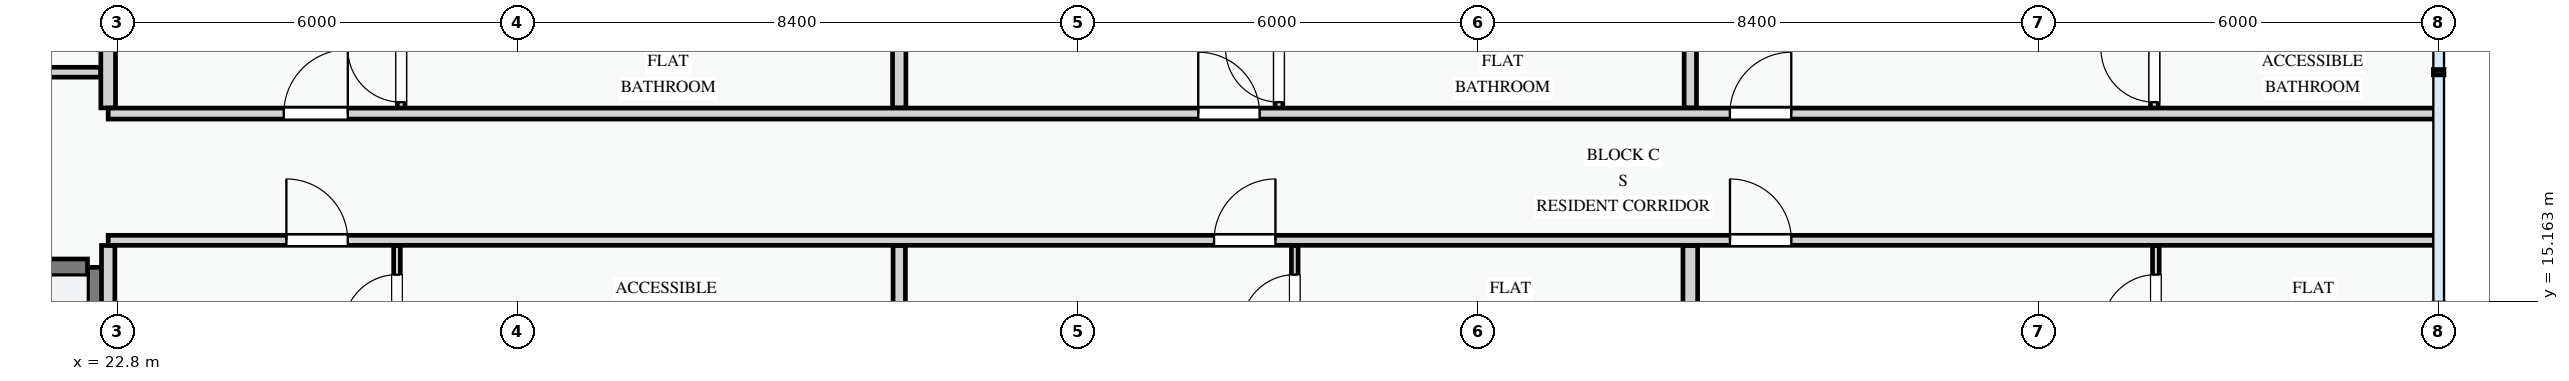
"""IFC4 building model, lengths in metres.
Left out: names, types, materials, properties, quantities, classifications, styles, units other than length and angle.
Written with IfcOpenShell. Run it as: python <this file> out.ifc"""

import sys

from ifc_helpers import new_model, si_unit, direction, frame, frame_2d, origin, place, context, subcontext, project, spatial, rectangle, extrude, element, fill, save


model = new_model("IFC4")
c1 = context("Model", 3, precision=1e-05, world=origin(), true_north=direction((0.0, 1.0)))
c2 = subcontext(c1, "Body", "Model", "MODEL_VIEW")
j1 = project(units=[si_unit("LENGTHUNIT", "METRE"), si_unit("PLANEANGLEUNIT", "RADIAN")], contexts=[c1])
p1 = place(None, origin())
s1 = spatial("IfcSite", under=j1, at=p1, CompositionType="ELEMENT")
p2 = place(p1, origin())
s2 = spatial("IfcBuilding", under=s1, at=p2, CompositionType="ELEMENT")
p3 = place(p2, frame((0.0, 0.0, 11.4)))
s3 = spatial("IfcBuildingStorey", under=s2, at=p3, CompositionType="ELEMENT", Elevation=11.4)
p4 = place(p3, frame((22.475, 8.75, 0.0), z_axis=(0.0, 0.0, 1.0), x_axis=(0.0, 1.0, 0.0)))
e1 = element("IfcWall", 1, at=p4, inside=s3, PredefinedType="SHEAR", context=c2, shape_type="SweptSolid", body=[
    extrude(rectangle(XDim=6.925, YDim=0.25, at=frame_2d((3.462, 0.0))), origin(), (0.0, 0.0, 1.0), 3.0),
])
p5 = place(p3, frame((8.85, 15.675, 0.0), z_axis=(0.0, 0.0, 1.0), x_axis=(1.0, 0.0, 0.0)))
e2 = element("IfcWall", 2, at=p5, inside=s3, PredefinedType="SHEAR", context=c2, shape_type="SweptSolid", body=[
    extrude(rectangle(XDim=13.5, YDim=0.25, at=frame_2d((6.75, 0.0))), origin(), (0.0, 0.0, 1.0), 3.0),
])
p6 = place(p5, frame((6.2, 0.0, 0.0)))
e3 = element("IfcOpeningElement", 3, at=p6, cuts=e2, PredefinedType="OPENING", context=c2, shape_type="SweptSolid", body=[
    extrude(rectangle(XDim=1.1, YDim=2.15, at=frame_2d((0.55, 1.075))), frame((0.0, 0.135, 0.0), z_axis=(0.0, -1.0, 0.0), x_axis=(1.0, 0.0, 0.0)), (0.0, 0.0, 1.0), 0.27),
])
p7 = place(p3, frame((18.025, 18.6, 0.0), z_axis=(0.0, 0.0, 1.0), x_axis=(1.0, 0.0, 0.0)))
e4 = element("IfcWall", 4, at=p7, inside=s3, PredefinedType="PARTITIONING", context=c2, shape_type="SweptSolid", body=[
    extrude(rectangle(XDim=4.523, YDim=0.148, at=frame_2d((2.262, 0.0))), origin(), (0.0, 0.0, 1.0), 3.0),
])
p8 = place(p7, frame((1.65, 0.0, 0.0)))
e5 = element("IfcOpeningElement", 5, at=p8, cuts=e4, PredefinedType="OPENING", context=c2, shape_type="SweptSolid", body=[
    extrude(rectangle(XDim=1.0, YDim=2.15, at=frame_2d((0.5, 1.075))), frame((0.0, 0.084, 0.0), z_axis=(0.0, -1.0, 0.0), x_axis=(1.0, 0.0, 0.0)), (0.0, 0.0, 1.0), 0.168),
])
p9 = place(p3, frame((26.99, 8.57, 0.0), z_axis=(0.0, 0.0, 1.0), x_axis=(0.0, 1.0, 0.0)))
e6 = element("IfcWall", 6, at=p9, inside=s3, PredefinedType="PARTITIONING", context=c2, shape_type="SweptSolid", body=[
    extrude(rectangle(XDim=7.433, YDim=0.1, at=frame_2d((3.717, 0.0))), origin(), (0.0, 0.0, 1.0), 3.0),
])
p10 = place(p9, frame((1.294, 0.0, 0.0)))
e7 = element("IfcOpeningElement", 7, at=p10, cuts=e6, PredefinedType="OPENING", context=c2, shape_type="SweptSolid", body=[
    extrude(rectangle(XDim=0.85, YDim=2.1, at=frame_2d((0.425, 1.05))), frame((0.0, 0.06, 0.0), z_axis=(0.0, -1.0, 0.0), x_axis=(1.0, 0.0, 0.0)), (0.0, 0.0, 1.0), 0.12),
])
p11 = place(p9, frame((4.19, 0.0, 0.0)))
e8 = element("IfcOpeningElement", 8, at=p11, cuts=e6, PredefinedType="OPENING", context=c2, shape_type="SweptSolid", body=[
    extrude(rectangle(XDim=0.85, YDim=2.1, at=frame_2d((0.425, 1.05))), frame((0.0, 0.06, 0.0), z_axis=(0.0, -1.0, 0.0), x_axis=(1.0, 0.0, 0.0)), (0.0, 0.0, 1.0), 0.12),
])
p12 = place(p9, frame((6.196, 0.0, 0.0)))
e9 = element("IfcOpeningElement", 9, at=p12, cuts=e6, PredefinedType="OPENING", context=c2, shape_type="SweptSolid", body=[
    extrude(rectangle(XDim=0.8, YDim=2.1, at=frame_2d((0.4, 1.05))), frame((0.0, 0.06, 0.0), z_axis=(0.0, -1.0, 0.0), x_axis=(1.0, 0.0, 0.0)), (0.0, 0.0, 1.0), 0.12),
])
p13 = place(p3, frame((27.053, 17.98, 0.0), z_axis=(0.0, 0.0, 1.0), x_axis=(0.0, 1.0, 0.0)))
e10 = element("IfcWall", 10, at=p13, inside=s3, PredefinedType="PARTITIONING", context=c2, shape_type="SweptSolid", body=[
    extrude(rectangle(XDim=4.651, YDim=0.115, at=frame_2d((2.325, 0.0))), origin(), (0.0, 0.0, 1.0), 3.0),
])
p14 = place(p13, frame((0.171, 0.0, 0.0)))
e11 = element("IfcOpeningElement", 11, at=p14, cuts=e10, PredefinedType="OPENING", context=c2, shape_type="SweptSolid", body=[
    extrude(rectangle(XDim=0.8, YDim=2.1, at=frame_2d((0.4, 1.05))), frame((0.0, 0.067, 0.0), z_axis=(0.0, -1.0, 0.0), x_axis=(1.0, 0.0, 0.0)), (0.0, 0.0, 1.0), 0.135),
])
p15 = place(p13, frame((1.384, 0.0, 0.0)))
e12 = element("IfcOpeningElement", 12, at=p15, cuts=e10, PredefinedType="OPENING", context=c2, shape_type="SweptSolid", body=[
    extrude(rectangle(XDim=0.85, YDim=2.1, at=frame_2d((0.425, 1.05))), frame((0.0, 0.067, 0.0), z_axis=(0.0, -1.0, 0.0), x_axis=(1.0, 0.0, 0.0)), (0.0, 0.0, 1.0), 0.135),
])
p16 = place(p13, frame((3.193, 0.0, 0.0)))
e13 = element("IfcOpeningElement", 13, at=p16, cuts=e10, PredefinedType="OPENING", context=c2, shape_type="SweptSolid", body=[
    extrude(rectangle(XDim=0.85, YDim=2.1, at=frame_2d((0.425, 1.05))), frame((0.0, 0.067, 0.0), z_axis=(0.0, -1.0, 0.0), x_axis=(1.0, 0.0, 0.0)), (0.0, 0.0, 1.0), 0.135),
])
p17 = place(p3, frame((22.66, 8.57, 0.0), z_axis=(0.0, 0.0, 1.0), x_axis=(0.0, 1.0, 0.0)))
e14 = element("IfcWall", 14, at=p17, inside=s3, PredefinedType="PARTITIONING", context=c2, shape_type="SweptSolid", body=[
    extrude(rectangle(XDim=7.433, YDim=0.2, at=frame_2d((3.717, 0.0))), origin(), (0.0, 0.0, 1.0), 2.425),
])
p18 = place(p3, frame((22.66, 18.064, 0.0), z_axis=(0.0, 0.0, 1.0), x_axis=(0.0, 1.0, 0.0)))
e15 = element("IfcWall", 15, at=p18, inside=s3, PredefinedType="PARTITIONING", context=c2, shape_type="SweptSolid", body=[
    extrude(rectangle(XDim=4.676, YDim=0.22, at=frame_2d((2.338, 0.0))), origin(), (0.0, 0.0, 1.0), 2.425),
])
p19 = place(p3, frame((40.45, 8.57, 0.0), z_axis=(0.0, 0.0, 1.0), x_axis=(0.0, 1.0, 0.0)))
e16 = element("IfcWall", 16, at=p19, inside=s3, PredefinedType="PARTITIONING", context=c2, shape_type="SweptSolid", body=[
    extrude(rectangle(XDim=7.433, YDim=0.1, at=frame_2d((3.717, 0.0))), origin(), (0.0, 0.0, 1.0), 3.0),
])
p20 = place(p19, frame((1.294, 0.0, 0.0)))
e17 = element("IfcOpeningElement", 17, at=p20, cuts=e16, PredefinedType="OPENING", context=c2, shape_type="SweptSolid", body=[
    extrude(rectangle(XDim=0.82, YDim=2.08, at=frame_2d((0.41, 1.04))), frame((0.0, 0.06, 0.0), z_axis=(0.0, -1.0, 0.0), x_axis=(1.0, 0.0, 0.0)), (0.0, 0.0, 1.0), 0.12),
])
p21 = place(p19, frame((4.19, 0.0, 0.0)))
e18 = element("IfcOpeningElement", 18, at=p21, cuts=e16, PredefinedType="OPENING", context=c2, shape_type="SweptSolid", body=[
    extrude(rectangle(XDim=0.85, YDim=2.1, at=frame_2d((0.425, 1.05))), frame((0.0, 0.06, 0.0), z_axis=(0.0, -1.0, 0.0), x_axis=(1.0, 0.0, 0.0)), (0.0, 0.0, 1.0), 0.12),
])
p22 = place(p19, frame((6.196, 0.0, 0.0)))
e19 = element("IfcOpeningElement", 19, at=p22, cuts=e16, PredefinedType="OPENING", context=c2, shape_type="SweptSolid", body=[
    extrude(rectangle(XDim=0.8, YDim=2.1, at=frame_2d((0.4, 1.05))), frame((0.0, 0.06, 0.0), z_axis=(0.0, -1.0, 0.0), x_axis=(1.0, 0.0, 0.0)), (0.0, 0.0, 1.0), 0.12),
])
p23 = place(p3, frame((40.213, 17.98, 0.0), z_axis=(0.0, 0.0, 1.0), x_axis=(0.0, 1.0, 0.0)))
e20 = element("IfcWall", 20, at=p23, inside=s3, PredefinedType="PARTITIONING", context=c2, shape_type="SweptSolid", body=[
    extrude(rectangle(XDim=4.651, YDim=0.115, at=frame_2d((2.325, 0.0))), origin(), (0.0, 0.0, 1.0), 3.0),
])
p24 = place(p23, frame((0.171, 0.0, 0.0)))
e21 = element("IfcOpeningElement", 21, at=p24, cuts=e20, PredefinedType="OPENING", context=c2, shape_type="SweptSolid", body=[
    extrude(rectangle(XDim=0.8, YDim=2.1, at=frame_2d((0.4, 1.05))), frame((0.0, 0.067, 0.0), z_axis=(0.0, -1.0, 0.0), x_axis=(1.0, 0.0, 0.0)), (0.0, 0.0, 1.0), 0.135),
])
p25 = place(p23, frame((1.384, 0.0, 0.0)))
e22 = element("IfcOpeningElement", 22, at=p25, cuts=e20, PredefinedType="OPENING", context=c2, shape_type="SweptSolid", body=[
    extrude(rectangle(XDim=0.82, YDim=2.08, at=frame_2d((0.41, 1.04))), frame((0.0, 0.067, 0.0), z_axis=(0.0, -1.0, 0.0), x_axis=(1.0, 0.0, 0.0)), (0.0, 0.0, 1.0), 0.135),
])
p26 = place(p23, frame((3.193, 0.0, 0.0)))
e23 = element("IfcOpeningElement", 23, at=p26, cuts=e20, PredefinedType="OPENING", context=c2, shape_type="SweptSolid", body=[
    extrude(rectangle(XDim=0.85, YDim=2.1, at=frame_2d((0.425, 1.05))), frame((0.0, 0.067, 0.0), z_axis=(0.0, -1.0, 0.0), x_axis=(1.0, 0.0, 0.0)), (0.0, 0.0, 1.0), 0.135),
])
p27 = place(p3, frame((34.52, 8.57, 0.0), z_axis=(0.0, 0.0, 1.0), x_axis=(0.0, 1.0, 0.0)))
e24 = element("IfcWall", 24, at=p27, inside=s3, PredefinedType="PARTITIONING", context=c2, shape_type="SweptSolid", body=[
    extrude(rectangle(XDim=7.433, YDim=0.185, at=frame_2d((3.717, 0.0))), origin(), (0.0, 0.0, 1.0), 3.0),
])
p28 = place(p3, frame((34.52, 18.064, 0.0), z_axis=(0.0, 0.0, 1.0), x_axis=(0.0, 1.0, 0.0)))
e25 = element("IfcWall", 25, at=p28, inside=s3, PredefinedType="PARTITIONING", context=c2, shape_type="SweptSolid", body=[
    extrude(rectangle(XDim=4.566, YDim=0.2, at=frame_2d((2.283, 0.0))), origin(), (0.0, 0.0, 1.0), 3.0),
])
p29 = place(p3, frame((53.36, 8.57, 0.0), z_axis=(0.0, 0.0, 1.0), x_axis=(0.0, 1.0, 0.0)))
e26 = element("IfcWall", 26, at=p29, inside=s3, PredefinedType="PARTITIONING", context=c2, shape_type="SweptSolid", body=[
    extrude(rectangle(XDim=7.433, YDim=0.1, at=frame_2d((3.717, 0.0))), origin(), (0.0, 0.0, 1.0), 3.0),
])
p30 = place(p29, frame((1.294, 0.0, 0.0)))
e27 = element("IfcOpeningElement", 27, at=p30, cuts=e26, PredefinedType="OPENING", context=c2, shape_type="SweptSolid", body=[
    extrude(rectangle(XDim=0.85, YDim=2.1, at=frame_2d((0.425, 1.05))), frame((0.0, 0.06, 0.0), z_axis=(0.0, -1.0, 0.0), x_axis=(1.0, 0.0, 0.0)), (0.0, 0.0, 1.0), 0.12),
])
p31 = place(p29, frame((4.19, 0.0, 0.0)))
e28 = element("IfcOpeningElement", 28, at=p31, cuts=e26, PredefinedType="OPENING", context=c2, shape_type="SweptSolid", body=[
    extrude(rectangle(XDim=0.85, YDim=2.1, at=frame_2d((0.425, 1.05))), frame((0.0, 0.06, 0.0), z_axis=(0.0, -1.0, 0.0), x_axis=(1.0, 0.0, 0.0)), (0.0, 0.0, 1.0), 0.12),
])
p32 = place(p29, frame((6.196, 0.0, 0.0)))
e29 = element("IfcOpeningElement", 29, at=p32, cuts=e26, PredefinedType="OPENING", context=c2, shape_type="SweptSolid", body=[
    extrude(rectangle(XDim=0.8, YDim=2.1, at=frame_2d((0.4, 1.05))), frame((0.0, 0.06, 0.0), z_axis=(0.0, -1.0, 0.0), x_axis=(1.0, 0.0, 0.0)), (0.0, 0.0, 1.0), 0.12),
])
p33 = place(p3, frame((53.337, 17.98, 0.0), z_axis=(0.0, 0.0, 1.0), x_axis=(0.0, 1.0, 0.0)))
e30 = element("IfcWall", 30, at=p33, inside=s3, PredefinedType="PARTITIONING", context=c2, shape_type="SweptSolid", body=[
    extrude(rectangle(XDim=4.651, YDim=0.115, at=frame_2d((2.325, 0.0))), origin(), (0.0, 0.0, 1.0), 3.0),
])
p34 = place(p33, frame((0.171, 0.0, 0.0)))
e31 = element("IfcOpeningElement", 31, at=p34, cuts=e30, PredefinedType="OPENING", context=c2, shape_type="SweptSolid", body=[
    extrude(rectangle(XDim=0.8, YDim=2.1, at=frame_2d((0.4, 1.05))), frame((0.0, 0.067, 0.0), z_axis=(0.0, -1.0, 0.0), x_axis=(1.0, 0.0, 0.0)), (0.0, 0.0, 1.0), 0.135),
])
p35 = place(p33, frame((1.384, 0.0, 0.0)))
e32 = element("IfcOpeningElement", 32, at=p35, cuts=e30, PredefinedType="OPENING", context=c2, shape_type="SweptSolid", body=[
    extrude(rectangle(XDim=0.85, YDim=2.1, at=frame_2d((0.425, 1.05))), frame((0.0, 0.067, 0.0), z_axis=(0.0, -1.0, 0.0), x_axis=(1.0, 0.0, 0.0)), (0.0, 0.0, 1.0), 0.135),
])
p36 = place(p33, frame((3.193, 0.0, 0.0)))
e33 = element("IfcOpeningElement", 33, at=p36, cuts=e30, PredefinedType="OPENING", context=c2, shape_type="SweptSolid", body=[
    extrude(rectangle(XDim=0.85, YDim=2.1, at=frame_2d((0.425, 1.05))), frame((0.0, 0.067, 0.0), z_axis=(0.0, -1.0, 0.0), x_axis=(1.0, 0.0, 0.0)), (0.0, 0.0, 1.0), 0.135),
])
p37 = place(p3, frame((46.38, 8.57, 0.0), z_axis=(0.0, 0.0, 1.0), x_axis=(0.0, 1.0, 0.0)))
e34 = element("IfcWall", 34, at=p37, inside=s3, PredefinedType="PARTITIONING", context=c2, shape_type="SweptSolid", body=[
    extrude(rectangle(XDim=7.433, YDim=0.22, at=frame_2d((3.717, 0.0))), origin(), (0.0, 0.0, 1.0), 3.0),
])
p38 = place(p3, frame((46.38, 18.064, 0.0), z_axis=(0.0, 0.0, 1.0), x_axis=(0.0, 1.0, 0.0)))
e35 = element("IfcWall", 35, at=p38, inside=s3, PredefinedType="PARTITIONING", context=c2, shape_type="SweptSolid", body=[
    extrude(rectangle(XDim=4.676, YDim=0.185, at=frame_2d((2.338, 0.0))), origin(), (0.0, 0.0, 1.0), 3.0),
])
p39 = place(p3, frame((22.66, 16.08, 0.0), z_axis=(0.0, 0.0, 1.0), x_axis=(1.0, 0.0, 0.0)))
e36 = element("IfcWall", 36, at=p39, inside=s3, PredefinedType="PARTITIONING", context=c2, shape_type="SweptSolid", body=[
    extrude(rectangle(XDim=34.88, YDim=0.15, at=frame_2d((17.44, 0.0))), origin(), (0.0, 0.0, 1.0), 3.0),
])
p40 = place(p39, frame((2.672, 0.0, 0.0)))
e37 = element("IfcOpeningElement", 37, at=p40, cuts=e36, PredefinedType="OPENING", context=c2, shape_type="SweptSolid", body=[
    extrude(rectangle(XDim=0.92, YDim=2.1, at=frame_2d((0.46, 1.05))), frame((0.0, 0.085, 0.0), z_axis=(0.0, -1.0, 0.0), x_axis=(1.0, 0.0, 0.0)), (0.0, 0.0, 1.0), 0.17),
])
p41 = place(p39, frame((16.58, 0.0, 0.0)))
e38 = element("IfcOpeningElement", 38, at=p41, cuts=e36, PredefinedType="OPENING", context=c2, shape_type="SweptSolid", body=[
    extrude(rectangle(XDim=0.92, YDim=2.1, at=frame_2d((0.46, 1.05))), frame((0.0, 0.085, 0.0), z_axis=(0.0, -1.0, 0.0), x_axis=(1.0, 0.0, 0.0)), (0.0, 0.0, 1.0), 0.17),
])
p42 = place(p39, frame((24.315, 0.0, 0.0)))
e39 = element("IfcOpeningElement", 39, at=p42, cuts=e36, PredefinedType="OPENING", context=c2, shape_type="SweptSolid", body=[
    extrude(rectangle(XDim=0.92, YDim=2.1, at=frame_2d((0.46, 1.05))), frame((0.0, 0.085, 0.0), z_axis=(0.0, -1.0, 0.0), x_axis=(1.0, 0.0, 0.0)), (0.0, 0.0, 1.0), 0.17),
])
p43 = place(p3, frame((22.66, 17.98, 0.0), z_axis=(0.0, 0.0, 1.0), x_axis=(1.0, 0.0, 0.0)))
e40 = element("IfcWall", 40, at=p43, inside=s3, PredefinedType="PARTITIONING", context=c2, shape_type="SweptSolid", body=[
    extrude(rectangle(XDim=34.88, YDim=0.165, at=frame_2d((17.44, 0.0))), origin(), (0.0, 0.0, 1.0), 3.0),
])
p44 = place(p43, frame((2.633, 0.0, 0.0)))
e41 = element("IfcOpeningElement", 41, at=p44, cuts=e40, PredefinedType="OPENING", context=c2, shape_type="SweptSolid", body=[
    extrude(rectangle(XDim=0.96, YDim=2.12, at=frame_2d((0.48, 1.06))), frame((0.0, 0.093, 0.0), z_axis=(0.0, -1.0, 0.0), x_axis=(1.0, 0.0, 0.0)), (0.0, 0.0, 1.0), 0.185),
])
p45 = place(p43, frame((16.343, 0.0, 0.0)))
e42 = element("IfcOpeningElement", 42, at=p45, cuts=e40, PredefinedType="OPENING", context=c2, shape_type="SweptSolid", body=[
    extrude(rectangle(XDim=0.92, YDim=2.1, at=frame_2d((0.46, 1.05))), frame((0.0, 0.093, 0.0), z_axis=(0.0, -1.0, 0.0), x_axis=(1.0, 0.0, 0.0)), (0.0, 0.0, 1.0), 0.185),
])
p46 = place(p43, frame((24.313, 0.0, 0.0)))
e43 = element("IfcOpeningElement", 43, at=p46, cuts=e40, PredefinedType="OPENING", context=c2, shape_type="SweptSolid", body=[
    extrude(rectangle(XDim=0.92, YDim=2.1, at=frame_2d((0.46, 1.05))), frame((0.0, 0.093, 0.0), z_axis=(0.0, -1.0, 0.0), x_axis=(1.0, 0.0, 0.0)), (0.0, 0.0, 1.0), 0.185),
])
p47 = place(p12, origin())
e44 = element("IfcDoor", 44, at=p47, inside=s3, OperationType="SINGLE_SWING_LEFT", PredefinedType="DOOR", context=c2, shape_type="SweptSolid", body=[
    extrude(rectangle(XDim=0.8, YDim=2.1, at=frame_2d((0.4, 1.05))), frame((0.0, 0.025, 0.0), z_axis=(0.0, -1.0, 0.0), x_axis=(1.0, 0.0, 0.0)), (0.0, 0.0, 1.0), 0.05),
])
fill(e9, e44)
p48 = place(p14, origin())
e45 = element("IfcDoor", 45, at=p48, inside=s3, OperationType="SINGLE_SWING_RIGHT", PredefinedType="DOOR", context=c2, shape_type="SweptSolid", body=[
    extrude(rectangle(XDim=0.8, YDim=2.1, at=frame_2d((0.4, 1.05))), frame((0.0, 0.025, 0.0), z_axis=(0.0, -1.0, 0.0), x_axis=(1.0, 0.0, 0.0)), (0.0, 0.0, 1.0), 0.05),
])
fill(e11, e45)
p49 = place(p22, origin())
e46 = element("IfcDoor", 46, at=p49, inside=s3, OperationType="SINGLE_SWING_LEFT", PredefinedType="DOOR", context=c2, shape_type="SweptSolid", body=[
    extrude(rectangle(XDim=0.8, YDim=2.1, at=frame_2d((0.4, 1.05))), frame((0.0, 0.025, 0.0), z_axis=(0.0, -1.0, 0.0), x_axis=(1.0, 0.0, 0.0)), (0.0, 0.0, 1.0), 0.05),
])
fill(e19, e46)
p50 = place(p24, origin())
e47 = element("IfcDoor", 47, at=p50, inside=s3, OperationType="SINGLE_SWING_RIGHT", PredefinedType="DOOR", context=c2, shape_type="SweptSolid", body=[
    extrude(rectangle(XDim=0.8, YDim=2.1, at=frame_2d((0.4, 1.05))), frame((0.0, 0.025, 0.0), z_axis=(0.0, -1.0, 0.0), x_axis=(1.0, 0.0, 0.0)), (0.0, 0.0, 1.0), 0.05),
])
fill(e21, e47)
p51 = place(p32, origin())
e48 = element("IfcDoor", 48, at=p51, inside=s3, OperationType="SINGLE_SWING_LEFT", PredefinedType="DOOR", context=c2, shape_type="SweptSolid", body=[
    extrude(rectangle(XDim=0.8, YDim=2.1, at=frame_2d((0.4, 1.05))), frame((0.0, 0.025, 0.0), z_axis=(0.0, -1.0, 0.0), x_axis=(1.0, 0.0, 0.0)), (0.0, 0.0, 1.0), 0.05),
])
fill(e29, e48)
p52 = place(p34, origin())
e49 = element("IfcDoor", 49, at=p52, inside=s3, OperationType="SINGLE_SWING_RIGHT", PredefinedType="DOOR", context=c2, shape_type="SweptSolid", body=[
    extrude(rectangle(XDim=0.8, YDim=2.1, at=frame_2d((0.4, 1.05))), frame((0.0, 0.025, 0.0), z_axis=(0.0, -1.0, 0.0), x_axis=(1.0, 0.0, 0.0)), (0.0, 0.0, 1.0), 0.05),
])
fill(e31, e49)
p53 = place(p40, origin())
e50 = element("IfcDoor", 50, at=p53, inside=s3, OperationType="SINGLE_SWING_LEFT", PredefinedType="DOOR", context=c2, shape_type="SweptSolid", body=[
    extrude(rectangle(XDim=0.92, YDim=2.1, at=frame_2d((0.46, 1.05))), frame((0.0, 0.025, 0.0), z_axis=(0.0, -1.0, 0.0), x_axis=(1.0, 0.0, 0.0)), (0.0, 0.0, 1.0), 0.05),
])
fill(e37, e50)
p54 = place(p41, origin())
e51 = element("IfcDoor", 51, at=p54, inside=s3, OperationType="SINGLE_SWING_RIGHT", PredefinedType="DOOR", context=c2, shape_type="SweptSolid", body=[
    extrude(rectangle(XDim=0.92, YDim=2.1, at=frame_2d((0.46, 1.05))), frame((0.0, 0.025, 0.0), z_axis=(0.0, -1.0, 0.0), x_axis=(1.0, 0.0, 0.0)), (0.0, 0.0, 1.0), 0.05),
])
fill(e38, e51)
p55 = place(p42, origin())
e52 = element("IfcDoor", 52, at=p55, inside=s3, OperationType="SINGLE_SWING_LEFT", PredefinedType="DOOR", context=c2, shape_type="SweptSolid", body=[
    extrude(rectangle(XDim=0.92, YDim=2.1, at=frame_2d((0.46, 1.05))), frame((0.0, 0.025, 0.0), z_axis=(0.0, -1.0, 0.0), x_axis=(1.0, 0.0, 0.0)), (0.0, 0.0, 1.0), 0.05),
])
fill(e39, e52)
p56 = place(p44, origin())
e53 = element("IfcDoor", 53, at=p56, inside=s3, OperationType="SINGLE_SWING_RIGHT", PredefinedType="DOOR", context=c2, shape_type="SweptSolid", body=[
    extrude(rectangle(XDim=0.96, YDim=2.12, at=frame_2d((0.48, 1.06))), frame((0.0, 0.025, 0.0), z_axis=(0.0, -1.0, 0.0), x_axis=(1.0, 0.0, 0.0)), (0.0, 0.0, 1.0), 0.05),
])
fill(e41, e53)
p57 = place(p45, origin())
e54 = element("IfcDoor", 54, at=p57, inside=s3, OperationType="SINGLE_SWING_LEFT", PredefinedType="DOOR", context=c2, shape_type="SweptSolid", body=[
    extrude(rectangle(XDim=0.92, YDim=2.1, at=frame_2d((0.46, 1.05))), frame((0.0, 0.025, 0.0), z_axis=(0.0, -1.0, 0.0), x_axis=(1.0, 0.0, 0.0)), (0.0, 0.0, 1.0), 0.05),
])
fill(e42, e54)
p58 = place(p46, origin())
e55 = element("IfcDoor", 55, at=p58, inside=s3, OperationType="SINGLE_SWING_RIGHT", PredefinedType="DOOR", context=c2, shape_type="SweptSolid", body=[
    extrude(rectangle(XDim=0.92, YDim=2.1, at=frame_2d((0.46, 1.05))), frame((0.0, 0.025, 0.0), z_axis=(0.0, -1.0, 0.0), x_axis=(1.0, 0.0, 0.0)), (0.0, 0.0, 1.0), 0.05),
])
fill(e43, e55)
save(model, sys.argv[1])
